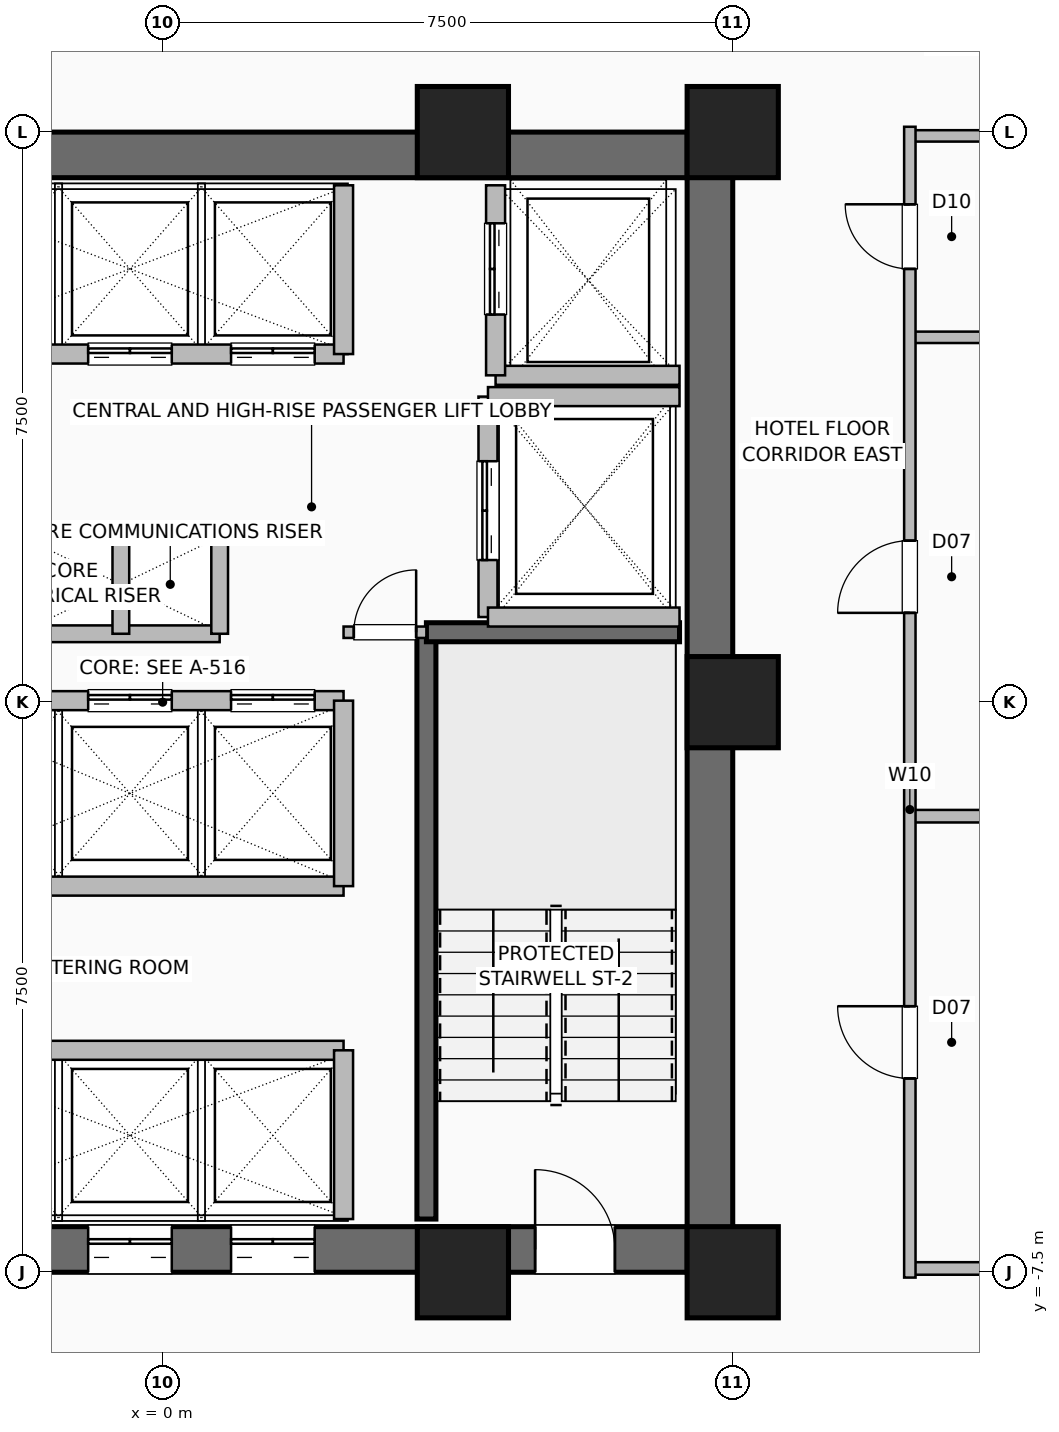
"""IFC4 building model, lengths in metres.
Left out: names, types, materials, properties, quantities, classifications, styles, units other than length and angle.
Written with IfcOpenShell. Run it as: python <this file> out.ifc"""

import sys

from ifc_helpers import new_model, si_unit, direction, frame, frame_2d, origin, origin_2d, place, context, subcontext, project, spatial, rectangle, hollow_rectangle, extrude, element, fill, save


model = new_model("IFC4")
c1 = context("Model", 3, precision=1e-05, world=origin(), true_north=direction((0.0, 1.0)))
c2 = subcontext(c1, "Body", "Model", "MODEL_VIEW")
j1 = project(units=[si_unit("LENGTHUNIT", "METRE"), si_unit("PLANEANGLEUNIT", "RADIAN")], contexts=[c1])
p1 = place(None, origin())
s1 = spatial("IfcSite", under=j1, at=p1, CompositionType="ELEMENT")
p2 = place(p1, origin())
s2 = spatial("IfcBuilding", under=s1, at=p2, CompositionType="ELEMENT")
p3 = place(p2, frame((0.0, 0.0, 58.5)))
s3 = spatial("IfcBuildingStorey", under=s2, at=p3, CompositionType="ELEMENT", Elevation=58.5)
for number, where, z_axis, x_axis in (
    (1, (3.95, -7.5, 0.0), (0.0, 0.0, 1.0), (1.0, 0.0, 0.0)),
    (2, (7.5, -7.5, 0.0), (0.0, 0.0, 1.0), (1.0, 0.0, 0.0)),
    (3, (7.5, 0.0, 0.0), (0.0, 0.0, 1.0), (1.0, 0.0, 0.0)),
    (4, (7.5, 7.5, 0.0), (0.0, 0.0, 1.0), (1.0, 0.0, 0.0)),
    (5, (3.95, 7.5, 0.0), (0.0, 0.0, 1.0), (1.0, 0.0, 0.0)),
):
    element("IfcColumn", number, at=place(p3, frame(where, z_axis=z_axis, x_axis=x_axis)), inside=s3, PredefinedType="COLUMN", context=c2, shape_type="SweptSolid", body=[
        extrude(hollow_rectangle(XDim=1.2, YDim=1.2, WallThickness=0.055, at=origin_2d()), origin(), (0.0, 0.0, 1.0), 3.5),
    ])
p4 = place(p3, frame((-7.5, -7.2, 0.0), z_axis=(0.0, 0.0, 1.0), x_axis=(1.0, 0.0, 0.0)))
e6 = element("IfcWall", 6, at=p4, inside=s3, PredefinedType="SHEAR", context=c2, shape_type="SweptSolid", body=[
    extrude(rectangle(XDim=15.0, YDim=0.6, at=frame_2d((7.5, 0.0))), origin(), (0.0, 0.0, 1.0), 3.25),
])
p5 = place(p4, frame((1.55, 0.0, 0.0)))
e7 = element("IfcOpeningElement", 7, at=p5, cuts=e6, PredefinedType="OPENING", context=c2, shape_type="SweptSolid", body=[
    extrude(rectangle(XDim=1.05, YDim=2.08, at=frame_2d((0.525, 1.04))), frame((0.0, 0.31, 0.0), z_axis=(0.0, -1.0, 0.0), x_axis=(1.0, 0.0, 0.0)), (0.0, 0.0, 1.0), 0.62),
])
p6 = place(p4, frame((12.4, 0.0, 0.0)))
e8 = element("IfcOpeningElement", 8, at=p6, cuts=e6, PredefinedType="OPENING", context=c2, shape_type="SweptSolid", body=[
    extrude(rectangle(XDim=1.05, YDim=2.08, at=frame_2d((0.525, 1.04))), frame((0.0, 0.31, 0.0), z_axis=(0.0, -1.0, 0.0), x_axis=(1.0, 0.0, 0.0)), (0.0, 0.0, 1.0), 0.62),
])
p7 = place(p4, frame((4.64, 0.0, 0.0)))
e9 = element("IfcOpeningElement", 9, at=p7, cuts=e6, PredefinedType="OPENING", context=c2, shape_type="SweptSolid", body=[
    extrude(rectangle(XDim=1.1, YDim=2.2, at=frame_2d((0.55, 1.1))), frame((0.0, 0.31, 0.0), z_axis=(0.0, -1.0, 0.0), x_axis=(1.0, 0.0, 0.0)), (0.0, 0.0, 1.0), 0.62),
])
p8 = place(p4, frame((6.52, 0.0, 0.0)))
e10 = element("IfcOpeningElement", 10, at=p8, cuts=e6, PredefinedType="OPENING", context=c2, shape_type="SweptSolid", body=[
    extrude(rectangle(XDim=1.1, YDim=2.2, at=frame_2d((0.55, 1.1))), frame((0.0, 0.31, 0.0), z_axis=(0.0, -1.0, 0.0), x_axis=(1.0, 0.0, 0.0)), (0.0, 0.0, 1.0), 0.62),
])
p9 = place(p4, frame((8.4, 0.0, 0.0)))
e11 = element("IfcOpeningElement", 11, at=p9, cuts=e6, PredefinedType="OPENING", context=c2, shape_type="SweptSolid", body=[
    extrude(rectangle(XDim=1.1, YDim=2.2, at=frame_2d((0.55, 1.1))), frame((0.0, 0.31, 0.0), z_axis=(0.0, -1.0, 0.0), x_axis=(1.0, 0.0, 0.0)), (0.0, 0.0, 1.0), 0.62),
])
for number, where, z_axis, x_axis in (
    (12, (-7.5, 7.2, 0.0), (0.0, 0.0, 1.0), (1.0, 0.0, 0.0)),
    (13, (7.2, -7.5, 0.0), (0.0, 0.0, 1.0), (0.0, 1.0, 0.0)),
):
    element("IfcWall", number, at=place(p3, frame(where, z_axis=z_axis, x_axis=x_axis)), inside=s3, PredefinedType="SHEAR", context=c2, shape_type="SweptSolid", body=[
        extrude(rectangle(XDim=15.0, YDim=0.6, at=frame_2d((7.5, 0.0))), origin(), (0.0, 0.0, 1.0), 3.25),
    ])
p10 = place(p3, frame((3.47, -6.8, 0.0), z_axis=(0.0, 0.0, 1.0), x_axis=(0.0, 1.0, 0.0)))
e14 = element("IfcWall", 14, at=p10, inside=s3, PredefinedType="SHEAR", context=c2, shape_type="SweptSolid", body=[
    extrude(rectangle(XDim=7.72, YDim=0.25, at=frame_2d((3.86, 0.0))), origin(), (0.0, 0.0, 1.0), 3.25),
])
p11 = place(p3, frame((3.47, 0.92, 0.0), z_axis=(0.0, 0.0, 1.0), x_axis=(1.0, 0.0, 0.0)))
e15 = element("IfcWall", 15, at=p11, inside=s3, PredefinedType="SHEAR", context=c2, shape_type="SweptSolid", body=[
    extrude(rectangle(XDim=3.33, YDim=0.25, at=frame_2d((1.665, 0.0))), origin(), (0.0, 0.0, 1.0), 3.25),
])
for number, where, z_axis, x_axis in (
    (16, (-1.85, 2.2, 0.0), (0.0, 0.0, 1.0), (1.0, 0.0, 0.0)),
    (17, (-1.85, 0.9, 0.0), (0.0, 0.0, 1.0), (1.0, 0.0, 0.0)),
):
    element("IfcWall", number, at=place(p3, frame(where, z_axis=z_axis, x_axis=x_axis)), inside=s3, PredefinedType="PARTITIONING", context=c2, shape_type="SweptSolid", body=[
        extrude(rectangle(XDim=2.6, YDim=0.22, at=frame_2d((1.3, 0.0))), origin(), (0.0, 0.0, 1.0), 3.25),
    ])
for number, where, z_axis, x_axis in (
    (18, (-0.55, 0.9, 0.0), (0.0, 0.0, 1.0), (0.0, 1.0, 0.0)),
    (19, (0.75, 0.9, 0.0), (0.0, 0.0, 1.0), (0.0, 1.0, 0.0)),
):
    element("IfcWall", number, at=place(p3, frame(where, z_axis=z_axis, x_axis=x_axis)), inside=s3, PredefinedType="PARTITIONING", context=c2, shape_type="SweptSolid", body=[
        extrude(rectangle(XDim=1.3, YDim=0.22, at=frame_2d((0.65, 0.0))), origin(), (0.0, 0.0, 1.0), 3.25),
    ])
p12 = place(p3, frame((-3.26, -4.58, 0.0), z_axis=(0.0, 0.0, 1.0), x_axis=(1.0, 0.0, 0.0)))
e20 = element("IfcWall", 20, at=p12, inside=s3, PredefinedType="SHEAR", context=c2, shape_type="SweptSolid", body=[
    extrude(rectangle(XDim=5.64, YDim=0.25, at=frame_2d((2.82, 0.0))), origin(), (0.0, 0.0, 1.0), 3.25),
])
p13 = place(p3, frame((2.38, -6.8, 0.0), z_axis=(0.0, 0.0, 1.0), x_axis=(0.0, 1.0, 0.0)))
e21 = element("IfcWall", 21, at=p13, inside=s3, PredefinedType="SHEAR", context=c2, shape_type="SweptSolid", body=[
    extrude(rectangle(XDim=2.22, YDim=0.25, at=frame_2d((1.11, 0.0))), origin(), (0.0, 0.0, 1.0), 3.25),
])
p14 = place(p3, frame((-3.26, 0.02, 0.0), z_axis=(0.0, 0.0, 1.0), x_axis=(1.0, 0.0, 0.0)))
e22 = element("IfcWall", 22, at=p14, inside=s3, PredefinedType="SHEAR", context=c2, shape_type="SweptSolid", body=[
    extrude(rectangle(XDim=5.64, YDim=0.25, at=frame_2d((2.82, 0.0))), origin(), (0.0, 0.0, 1.0), 3.25),
])
p15 = place(p14, frame((0.4, 0.0, 0.0)))
e23 = element("IfcOpeningElement", 23, at=p15, cuts=e22, PredefinedType="OPENING", context=c2, shape_type="SweptSolid", body=[
    extrude(rectangle(XDim=1.1, YDim=2.2, at=frame_2d((0.55, 1.1))), frame((0.0, 0.135, 0.0), z_axis=(0.0, -1.0, 0.0), x_axis=(1.0, 0.0, 0.0)), (0.0, 0.0, 1.0), 0.27),
])
p16 = place(p14, frame((2.28, 0.0, 0.0)))
e24 = element("IfcOpeningElement", 24, at=p16, cuts=e22, PredefinedType="OPENING", context=c2, shape_type="SweptSolid", body=[
    extrude(rectangle(XDim=1.1, YDim=2.2, at=frame_2d((0.55, 1.1))), frame((0.0, 0.135, 0.0), z_axis=(0.0, -1.0, 0.0), x_axis=(1.0, 0.0, 0.0)), (0.0, 0.0, 1.0), 0.27),
])
p17 = place(p14, frame((4.16, 0.0, 0.0)))
e25 = element("IfcOpeningElement", 25, at=p17, cuts=e22, PredefinedType="OPENING", context=c2, shape_type="SweptSolid", body=[
    extrude(rectangle(XDim=1.1, YDim=2.2, at=frame_2d((0.55, 1.1))), frame((0.0, 0.135, 0.0), z_axis=(0.0, -1.0, 0.0), x_axis=(1.0, 0.0, 0.0)), (0.0, 0.0, 1.0), 0.27),
])
p18 = place(p3, frame((-3.26, -2.42, 0.0), z_axis=(0.0, 0.0, 1.0), x_axis=(1.0, 0.0, 0.0)))
e26 = element("IfcWall", 26, at=p18, inside=s3, PredefinedType="SHEAR", context=c2, shape_type="SweptSolid", body=[
    extrude(rectangle(XDim=5.64, YDim=0.25, at=frame_2d((2.82, 0.0))), origin(), (0.0, 0.0, 1.0), 3.25),
])
p19 = place(p3, frame((2.38, -2.42, 0.0), z_axis=(0.0, 0.0, 1.0), x_axis=(0.0, 1.0, 0.0)))
e27 = element("IfcWall", 27, at=p19, inside=s3, PredefinedType="SHEAR", context=c2, shape_type="SweptSolid", body=[
    extrude(rectangle(XDim=2.44, YDim=0.25, at=frame_2d((1.22, 0.0))), origin(), (0.0, 0.0, 1.0), 3.25),
])
p20 = place(p3, frame((-3.26, 4.58, 0.0), z_axis=(0.0, 0.0, 1.0), x_axis=(1.0, 0.0, 0.0)))
e28 = element("IfcWall", 28, at=p20, inside=s3, PredefinedType="SHEAR", context=c2, shape_type="SweptSolid", body=[
    extrude(rectangle(XDim=5.64, YDim=0.25, at=frame_2d((2.82, 0.0))), origin(), (0.0, 0.0, 1.0), 3.25),
])
p21 = place(p20, frame((0.4, 0.0, 0.0)))
e29 = element("IfcOpeningElement", 29, at=p21, cuts=e28, PredefinedType="OPENING", context=c2, shape_type="SweptSolid", body=[
    extrude(rectangle(XDim=1.1, YDim=2.2, at=frame_2d((0.55, 1.1))), frame((0.0, 0.135, 0.0), z_axis=(0.0, -1.0, 0.0), x_axis=(1.0, 0.0, 0.0)), (0.0, 0.0, 1.0), 0.27),
])
p22 = place(p20, frame((2.28, 0.0, 0.0)))
e30 = element("IfcOpeningElement", 30, at=p22, cuts=e28, PredefinedType="OPENING", context=c2, shape_type="SweptSolid", body=[
    extrude(rectangle(XDim=1.1, YDim=2.2, at=frame_2d((0.55, 1.1))), frame((0.0, 0.135, 0.0), z_axis=(0.0, -1.0, 0.0), x_axis=(1.0, 0.0, 0.0)), (0.0, 0.0, 1.0), 0.27),
])
p23 = place(p20, frame((4.16, 0.0, 0.0)))
e31 = element("IfcOpeningElement", 31, at=p23, cuts=e28, PredefinedType="OPENING", context=c2, shape_type="SweptSolid", body=[
    extrude(rectangle(XDim=1.1, YDim=2.2, at=frame_2d((0.55, 1.1))), frame((0.0, 0.135, 0.0), z_axis=(0.0, -1.0, 0.0), x_axis=(1.0, 0.0, 0.0)), (0.0, 0.0, 1.0), 0.27),
])
p24 = place(p3, frame((2.38, 4.58, 0.0), z_axis=(0.0, 0.0, 1.0), x_axis=(0.0, 1.0, 0.0)))
e32 = element("IfcWall", 32, at=p24, inside=s3, PredefinedType="SHEAR", context=c2, shape_type="SweptSolid", body=[
    extrude(rectangle(XDim=2.22, YDim=0.25, at=frame_2d((1.11, 0.0))), origin(), (0.0, 0.0, 1.0), 3.25),
])
p25 = place(p3, frame((4.38, 4.3, 0.0), z_axis=(0.0, 0.0, 1.0), x_axis=(1.0, 0.0, 0.0)))
e33 = element("IfcWall", 33, at=p25, inside=s3, PredefinedType="SHEAR", context=c2, shape_type="SweptSolid", body=[
    extrude(rectangle(XDim=2.42, YDim=0.25, at=frame_2d((1.21, 0.0))), origin(), (0.0, 0.0, 1.0), 3.25),
])
p26 = place(p3, frame((4.38, 4.3, 0.0), z_axis=(0.0, 0.0, 1.0), x_axis=(0.0, 1.0, 0.0)))
e34 = element("IfcWall", 34, at=p26, inside=s3, PredefinedType="SHEAR", context=c2, shape_type="SweptSolid", body=[
    extrude(rectangle(XDim=2.5, YDim=0.25, at=frame_2d((1.25, 0.0))), origin(), (0.0, 0.0, 1.0), 3.25),
])
p27 = place(p26, frame((0.8, 0.0, 0.0)))
e35 = element("IfcOpeningElement", 35, at=p27, cuts=e34, PredefinedType="OPENING", context=c2, shape_type="SweptSolid", body=[
    extrude(rectangle(XDim=1.2, YDim=2.2, at=frame_2d((0.6, 1.1))), frame((0.0, 0.135, 0.0), z_axis=(0.0, -1.0, 0.0), x_axis=(1.0, 0.0, 0.0)), (0.0, 0.0, 1.0), 0.27),
])
p28 = place(p3, frame((4.28, 1.12, 0.0), z_axis=(0.0, 0.0, 1.0), x_axis=(0.0, 1.0, 0.0)))
e36 = element("IfcWall", 36, at=p28, inside=s3, PredefinedType="SHEAR", context=c2, shape_type="SweptSolid", body=[
    extrude(rectangle(XDim=2.9, YDim=0.25, at=frame_2d((1.45, 0.0))), origin(), (0.0, 0.0, 1.0), 3.25),
])
p29 = place(p28, frame((0.75, 0.0, 0.0)))
e37 = element("IfcOpeningElement", 37, at=p29, cuts=e36, PredefinedType="OPENING", context=c2, shape_type="SweptSolid", body=[
    extrude(rectangle(XDim=1.3, YDim=2.3, at=frame_2d((0.65, 1.15))), frame((0.0, 0.135, 0.0), z_axis=(0.0, -1.0, 0.0), x_axis=(1.0, 0.0, 0.0)), (0.0, 0.0, 1.0), 0.27),
])
for number, where, z_axis, x_axis in (
    (38, (4.28, 1.12, 0.0), (0.0, 0.0, 1.0), (1.0, 0.0, 0.0)),
    (39, (4.28, 4.02, 0.0), (0.0, 0.0, 1.0), (1.0, 0.0, 0.0)),
):
    element("IfcWall", number, at=place(p3, frame(where, z_axis=z_axis, x_axis=x_axis)), inside=s3, PredefinedType="SHEAR", context=c2, shape_type="SweptSolid", body=[
        extrude(rectangle(XDim=2.52, YDim=0.25, at=frame_2d((1.26, 0.0))), origin(), (0.0, 0.0, 1.0), 3.25),
    ])
p30 = place(p3, frame((2.38, 0.92, 0.0), z_axis=(0.0, 0.0, 1.0), x_axis=(1.0, 0.0, 0.0)))
e40 = element("IfcWall", 40, at=p30, inside=s3, PredefinedType="PARTITIONING", context=c2, shape_type="SweptSolid", body=[
    extrude(rectangle(XDim=1.09, YDim=0.15, at=frame_2d((0.545, 0.0))), origin(), (0.0, 0.0, 1.0), 3.25),
])
p31 = place(p30, frame((0.135, 0.0, 0.0)))
e41 = element("IfcOpeningElement", 41, at=p31, cuts=e40, PredefinedType="OPENING", context=c2, shape_type="SweptSolid", body=[
    extrude(rectangle(XDim=0.82, YDim=2.05, at=frame_2d((0.41, 1.025))), frame((0.0, 0.085, 0.0), z_axis=(0.0, -1.0, 0.0), x_axis=(1.0, 0.0, 0.0)), (0.0, 0.0, 1.0), 0.17),
])
for number, where, z_axis, x_axis in (
    (42, (9.83, -7.45, 0.0), (0.0, 0.0, 1.0), (1.0, 0.0, 0.0)),
    (43, (9.83, -1.5, 0.0), (0.0, 0.0, 1.0), (1.0, 0.0, 0.0)),
):
    element("IfcWall", number, at=place(p3, frame(where, z_axis=z_axis, x_axis=x_axis)), inside=s3, PredefinedType="PLUMBINGWALL", context=c2, shape_type="SweptSolid", body=[
        extrude(rectangle(XDim=13.99, YDim=0.165, at=frame_2d((6.995, 0.0))), origin(), (0.0, 0.0, 1.0), 3.25),
    ])
for number, where, z_axis, x_axis in (
    (44, (9.83, 4.8, 0.0), (0.0, 0.0, 1.0), (1.0, 0.0, 0.0)),
    (45, (9.83, 7.45, 0.0), (0.0, 0.0, 1.0), (1.0, 0.0, 0.0)),
):
    element("IfcWall", number, at=place(p3, frame(where, z_axis=z_axis, x_axis=x_axis)), inside=s3, PredefinedType="PARTITIONING", context=c2, shape_type="SweptSolid", body=[
        extrude(rectangle(XDim=13.99, YDim=0.15, at=frame_2d((6.995, 0.0))), origin(), (0.0, 0.0, 1.0), 3.25),
    ])
p32 = place(p3, frame((9.83, -7.57, 0.0), z_axis=(0.0, 0.0, 1.0), x_axis=(0.0, 1.0, 0.0)))
e46 = element("IfcWall", 46, at=p32, inside=s3, PredefinedType="PARTITIONING", context=c2, shape_type="SweptSolid", body=[
    extrude(rectangle(XDim=15.14, YDim=0.15, at=frame_2d((7.57, 0.0))), origin(), (0.0, 0.0, 1.0), 3.25),
])
p33 = place(p32, frame((2.62, 0.0, 0.0)))
e47 = element("IfcOpeningElement", 47, at=p33, cuts=e46, PredefinedType="OPENING", context=c2, shape_type="SweptSolid", body=[
    extrude(rectangle(XDim=0.95, YDim=2.06, at=frame_2d((0.475, 1.03))), frame((0.0, 0.085, 0.0), z_axis=(0.0, -1.0, 0.0), x_axis=(1.0, 0.0, 0.0)), (0.0, 0.0, 1.0), 0.17),
])
p34 = place(p32, frame((8.745, 0.0, 0.0)))
e48 = element("IfcOpeningElement", 48, at=p34, cuts=e46, PredefinedType="OPENING", context=c2, shape_type="SweptSolid", body=[
    extrude(rectangle(XDim=0.95, YDim=2.06, at=frame_2d((0.475, 1.03))), frame((0.0, 0.085, 0.0), z_axis=(0.0, -1.0, 0.0), x_axis=(1.0, 0.0, 0.0)), (0.0, 0.0, 1.0), 0.17),
])
p35 = place(p32, frame((13.27, 0.0, 0.0)))
e49 = element("IfcOpeningElement", 49, at=p35, cuts=e46, PredefinedType="OPENING", context=c2, shape_type="SweptSolid", body=[
    extrude(rectangle(XDim=0.85, YDim=2.05, at=frame_2d((0.425, 1.025))), frame((0.0, 0.085, 0.0), z_axis=(0.0, -1.0, 0.0), x_axis=(1.0, 0.0, 0.0)), (0.0, 0.0, 1.0), 0.17),
])
p36 = place(p6, origin())
e50 = element("IfcDoor", 50, at=p36, inside=s3, OperationType="SINGLE_SWING_LEFT", PredefinedType="DOOR", context=c2, shape_type="SweptSolid", body=[
    extrude(rectangle(XDim=1.05, YDim=2.08, at=frame_2d((0.525, 1.04))), frame((0.0, 0.025, 0.0), z_axis=(0.0, -1.0, 0.0), x_axis=(1.0, 0.0, 0.0)), (0.0, 0.0, 1.0), 0.05),
])
fill(e8, e50)
p37 = place(p8, origin())
e51 = element("IfcDoor", 51, at=p37, inside=s3, OperationType="DOUBLE_DOOR_SLIDING", PredefinedType="DOOR", context=c2, shape_type="SweptSolid", body=[
    extrude(rectangle(XDim=1.1, YDim=2.2, at=frame_2d((0.55, 1.1))), frame((0.0, 0.025, 0.0), z_axis=(0.0, -1.0, 0.0), x_axis=(1.0, 0.0, 0.0)), (0.0, 0.0, 1.0), 0.05),
])
fill(e10, e51)
p38 = place(p9, origin())
e52 = element("IfcDoor", 52, at=p38, inside=s3, OperationType="DOUBLE_DOOR_SLIDING", PredefinedType="DOOR", context=c2, shape_type="SweptSolid", body=[
    extrude(rectangle(XDim=1.1, YDim=2.2, at=frame_2d((0.55, 1.1))), frame((0.0, 0.025, 0.0), z_axis=(0.0, -1.0, 0.0), x_axis=(1.0, 0.0, 0.0)), (0.0, 0.0, 1.0), 0.05),
])
fill(e11, e52)
p39 = place(p16, origin())
e53 = element("IfcDoor", 53, at=p39, inside=s3, OperationType="DOUBLE_DOOR_SLIDING", PredefinedType="DOOR", context=c2, shape_type="SweptSolid", body=[
    extrude(rectangle(XDim=1.1, YDim=2.2, at=frame_2d((0.55, 1.1))), frame((0.0, 0.025, 0.0), z_axis=(0.0, -1.0, 0.0), x_axis=(1.0, 0.0, 0.0)), (0.0, 0.0, 1.0), 0.05),
])
fill(e24, e53)
p40 = place(p17, origin())
e54 = element("IfcDoor", 54, at=p40, inside=s3, OperationType="DOUBLE_DOOR_SLIDING", PredefinedType="DOOR", context=c2, shape_type="SweptSolid", body=[
    extrude(rectangle(XDim=1.1, YDim=2.2, at=frame_2d((0.55, 1.1))), frame((0.0, 0.025, 0.0), z_axis=(0.0, -1.0, 0.0), x_axis=(1.0, 0.0, 0.0)), (0.0, 0.0, 1.0), 0.05),
])
fill(e25, e54)
p41 = place(p22, origin())
e55 = element("IfcDoor", 55, at=p41, inside=s3, OperationType="DOUBLE_DOOR_SLIDING", PredefinedType="DOOR", context=c2, shape_type="SweptSolid", body=[
    extrude(rectangle(XDim=1.1, YDim=2.2, at=frame_2d((0.55, 1.1))), frame((0.0, 0.025, 0.0), z_axis=(0.0, -1.0, 0.0), x_axis=(1.0, 0.0, 0.0)), (0.0, 0.0, 1.0), 0.05),
])
fill(e30, e55)
p42 = place(p23, origin())
e56 = element("IfcDoor", 56, at=p42, inside=s3, OperationType="DOUBLE_DOOR_SLIDING", PredefinedType="DOOR", context=c2, shape_type="SweptSolid", body=[
    extrude(rectangle(XDim=1.1, YDim=2.2, at=frame_2d((0.55, 1.1))), frame((0.0, 0.025, 0.0), z_axis=(0.0, -1.0, 0.0), x_axis=(1.0, 0.0, 0.0)), (0.0, 0.0, 1.0), 0.05),
])
fill(e31, e56)
p43 = place(p27, origin())
e57 = element("IfcDoor", 57, at=p43, inside=s3, OperationType="DOUBLE_DOOR_SLIDING", PredefinedType="DOOR", context=c2, shape_type="SweptSolid", body=[
    extrude(rectangle(XDim=1.2, YDim=2.2, at=frame_2d((0.6, 1.1))), frame((0.0, 0.025, 0.0), z_axis=(0.0, -1.0, 0.0), x_axis=(1.0, 0.0, 0.0)), (0.0, 0.0, 1.0), 0.05),
])
fill(e35, e57)
p44 = place(p29, origin())
e58 = element("IfcDoor", 58, at=p44, inside=s3, OperationType="DOUBLE_DOOR_SLIDING", PredefinedType="DOOR", context=c2, shape_type="SweptSolid", body=[
    extrude(rectangle(XDim=1.3, YDim=2.3, at=frame_2d((0.65, 1.15))), frame((0.0, 0.025, 0.0), z_axis=(0.0, -1.0, 0.0), x_axis=(1.0, 0.0, 0.0)), (0.0, 0.0, 1.0), 0.05),
])
fill(e37, e58)
p45 = place(p31, origin())
e59 = element("IfcDoor", 59, at=p45, inside=s3, OperationType="SINGLE_SWING_RIGHT", PredefinedType="DOOR", context=c2, shape_type="SweptSolid", body=[
    extrude(rectangle(XDim=0.82, YDim=2.05, at=frame_2d((0.41, 1.025))), frame((0.0, 0.025, 0.0), z_axis=(0.0, -1.0, 0.0), x_axis=(1.0, 0.0, 0.0)), (0.0, 0.0, 1.0), 0.05),
])
fill(e41, e59)
p46 = place(p33, origin())
e60 = element("IfcDoor", 60, at=p46, inside=s3, OperationType="SINGLE_SWING_RIGHT", PredefinedType="DOOR", context=c2, shape_type="SweptSolid", body=[
    extrude(rectangle(XDim=0.95, YDim=2.06, at=frame_2d((0.475, 1.03))), frame((0.0, 0.025, 0.0), z_axis=(0.0, -1.0, 0.0), x_axis=(1.0, 0.0, 0.0)), (0.0, 0.0, 1.0), 0.05),
])
fill(e47, e60)
p47 = place(p34, origin())
e61 = element("IfcDoor", 61, at=p47, inside=s3, OperationType="SINGLE_SWING_LEFT", PredefinedType="DOOR", context=c2, shape_type="SweptSolid", body=[
    extrude(rectangle(XDim=0.95, YDim=2.06, at=frame_2d((0.475, 1.03))), frame((0.0, 0.025, 0.0), z_axis=(0.0, -1.0, 0.0), x_axis=(1.0, 0.0, 0.0)), (0.0, 0.0, 1.0), 0.05),
])
fill(e48, e61)
p48 = place(p35, origin())
e62 = element("IfcDoor", 62, at=p48, inside=s3, OperationType="SINGLE_SWING_RIGHT", PredefinedType="DOOR", context=c2, shape_type="SweptSolid", body=[
    extrude(rectangle(XDim=0.85, YDim=2.05, at=frame_2d((0.425, 1.025))), frame((0.0, 0.025, 0.0), z_axis=(0.0, -1.0, 0.0), x_axis=(1.0, 0.0, 0.0)), (0.0, 0.0, 1.0), 0.05),
])
fill(e49, e62)
save(model, sys.argv[1])
